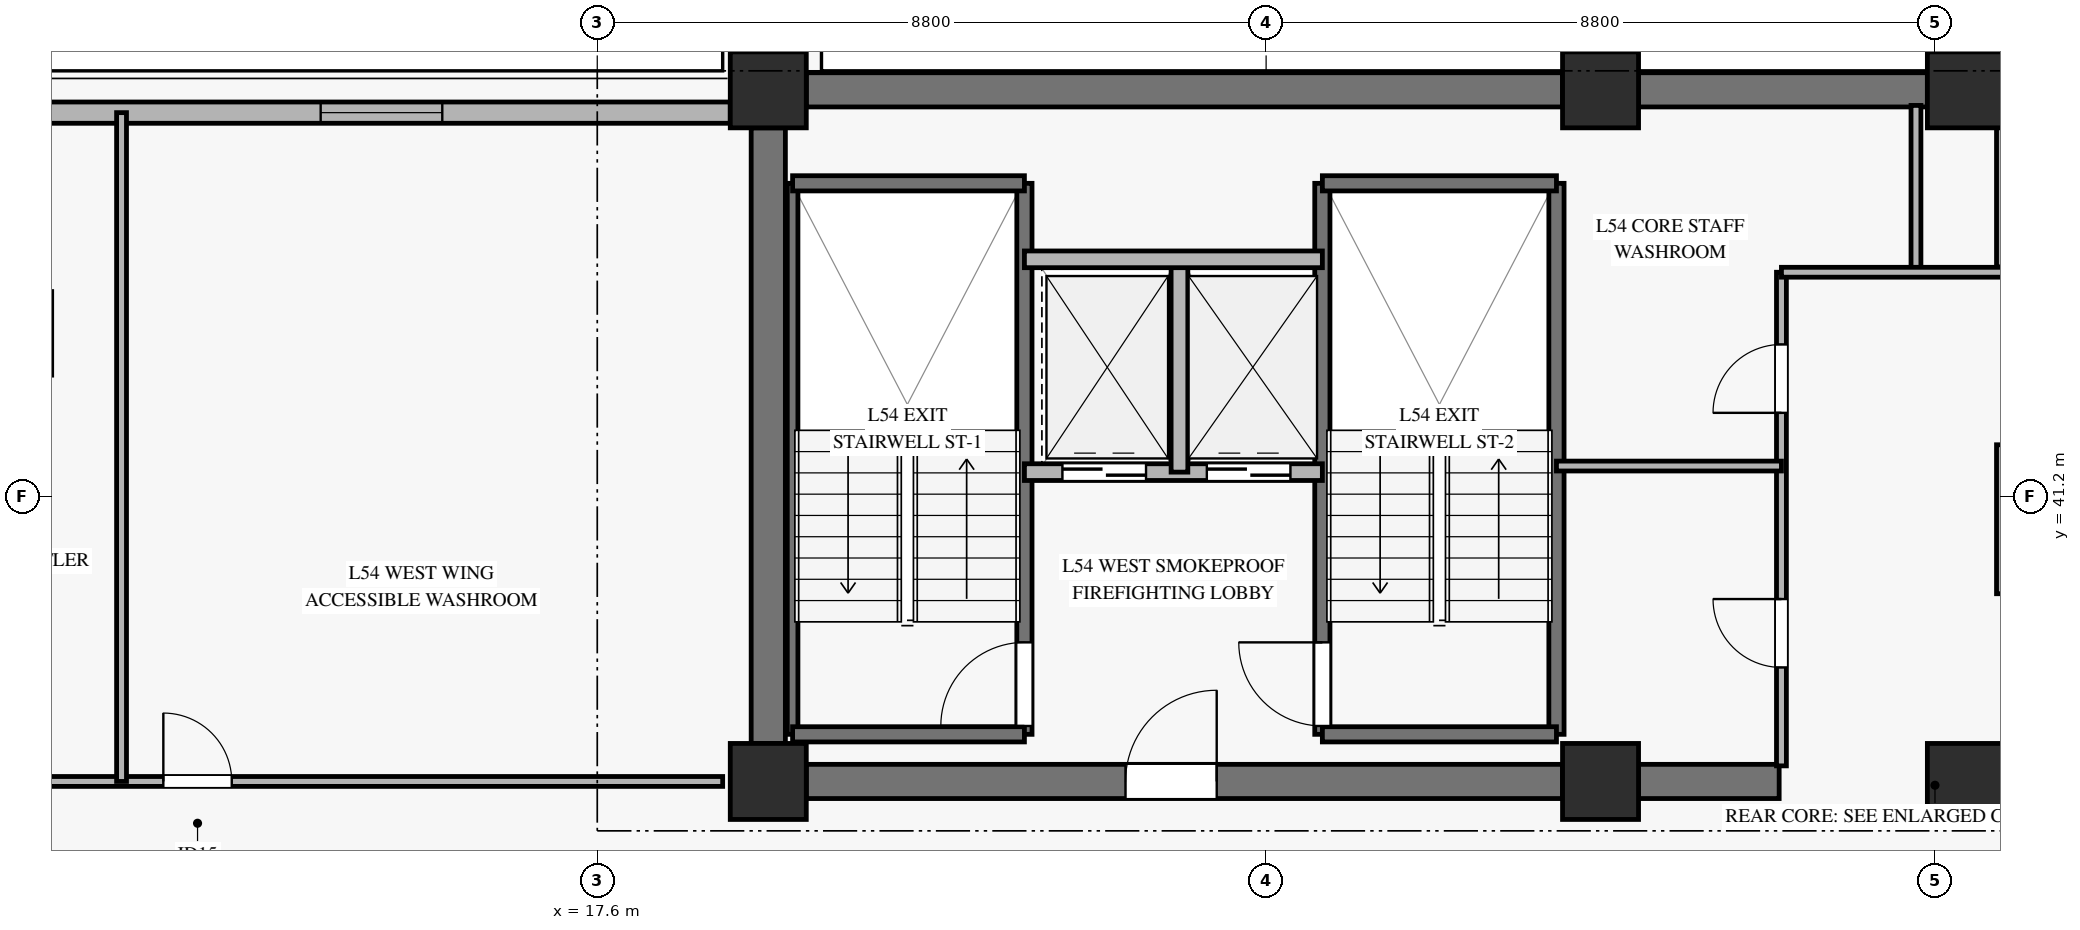
"""IFC4 building model, lengths in metres.
Left out: names, types, materials, properties, quantities, classifications, styles, units other than length and angle.
Written with IfcOpenShell. Run it as: python <this file> out.ifc"""

import sys

from ifc_helpers import new_model, si_unit, direction, frame, frame_2d, origin, origin_2d, place, context, subcontext, project, spatial, rectangle, hollow_rectangle, extrude, source, transform, mapped, element, fill, save


model = new_model("IFC4")
c1 = context("Model", 3, precision=1e-05, world=origin(), true_north=direction((0.0, 1.0)))
c2 = subcontext(c1, "Body", "Model", "MODEL_VIEW")
j1 = project(units=[si_unit("LENGTHUNIT", "METRE"), si_unit("PLANEANGLEUNIT", "RADIAN")], contexts=[c1])
p1 = place(None, origin())
s1 = spatial("IfcSite", under=j1, at=p1, CompositionType="ELEMENT")
p2 = place(p1, origin())
s2 = spatial("IfcBuilding", under=s1, at=p2, CompositionType="ELEMENT")
p3 = place(p2, frame((0.0, 0.0, 213.2)))
s3 = spatial("IfcBuildingStorey", under=s2, at=p3, CompositionType="ELEMENT", Elevation=213.2)
m1 = source(origin(), c2, "Body", "SweptSolid", [
    extrude(rectangle(XDim=1.0, YDim=1.0, at=origin_2d()), origin(), (0.0, 0.0, 1.0), 3.27),
])
for number, where, z_axis, x_axis in (
    (1, (19.85, 37.45, 0.0), (0.0, 0.0, 1.0), (1.0, 0.0, 0.0)),
    (2, (19.85, 46.55, 0.0), (0.0, 0.0, 1.0), (1.0, 0.0, 0.0)),
    (3, (30.8, 37.45, 0.0), (0.0, 0.0, 1.0), (1.0, 0.0, 0.0)),
    (4, (30.8, 46.55, 0.0), (0.0, 0.0, 1.0), (1.0, 0.0, 0.0)),
    (5, (35.6, 37.45, 0.0), (0.0, 0.0, 1.0), (1.0, 0.0, 0.0)),
    (6, (35.6, 46.55, 0.0), (0.0, 0.0, 1.0), (1.0, 0.0, 0.0)),
):
    element("IfcColumn", number, at=place(p3, frame(where, z_axis=z_axis, x_axis=x_axis)), inside=s3, PredefinedType="PILASTER", context=c2, shape_type="MappedRepresentation", body=[
        mapped(m1, transform((0.0, 0.0, 0.0), x_axis=(1.0, 0.0, 0.0), y_axis=(0.0, 1.0, 0.0), z_axis=(0.0, 0.0, 1.0), scale=1.0)),
    ])
p4 = place(p3, frame((20.35, 46.55, 0.0), z_axis=(0.0, 0.0, 1.0), x_axis=(1.0, 0.0, 0.0)))
e7 = element("IfcWall", 7, at=p4, inside=s3, PredefinedType="SHEAR", context=c2, shape_type="SweptSolid", body=[
    extrude(rectangle(XDim=9.95, YDim=0.45, at=frame_2d((4.975, 0.0))), origin(), (0.0, 0.0, 1.0), 3.27),
])
p5 = place(p3, frame((31.3, 46.55, 0.0), z_axis=(0.0, 0.0, 1.0), x_axis=(1.0, 0.0, 0.0)))
e8 = element("IfcWall", 8, at=p5, inside=s3, PredefinedType="SHEAR", context=c2, shape_type="SweptSolid", body=[
    extrude(rectangle(XDim=3.8, YDim=0.45, at=frame_2d((1.9, 0.0))), origin(), (0.0, 0.0, 1.0), 3.27),
])
p6 = place(p3, frame((20.35, 37.45, 0.0), z_axis=(0.0, 0.0, 1.0), x_axis=(1.0, 0.0, 0.0)))
e9 = element("IfcWall", 9, at=p6, inside=s3, PredefinedType="SHEAR", context=c2, shape_type="SweptSolid", body=[
    extrude(rectangle(XDim=9.95, YDim=0.45, at=frame_2d((4.975, 0.0))), origin(), (0.0, 0.0, 1.0), 3.27),
])
p7 = place(p6, frame((4.2, 0.0, 0.0)))
e10 = element("IfcOpeningElement", 10, at=p7, cuts=e9, PredefinedType="OPENING", context=c2, shape_type="SweptSolid", body=[
    extrude(rectangle(XDim=1.2, YDim=2.15, at=frame_2d((0.6, 1.075))), frame((0.0, 0.235, 0.0), z_axis=(0.0, -1.0, 0.0), x_axis=(1.0, 0.0, 0.0)), (0.0, 0.0, 1.0), 0.47),
])
p8 = place(p3, frame((31.3, 37.45, 0.0), z_axis=(0.0, 0.0, 1.0), x_axis=(1.0, 0.0, 0.0)))
e11 = element("IfcWall", 11, at=p8, inside=s3, PredefinedType="SHEAR", context=c2, shape_type="SweptSolid", body=[
    extrude(rectangle(XDim=1.85, YDim=0.45, at=frame_2d((0.925, 0.0))), origin(), (0.0, 0.0, 1.0), 3.27),
])
p9 = place(p3, frame((19.85, 37.95, 0.0), z_axis=(0.0, 0.0, 1.0), x_axis=(0.0, 1.0, 0.0)))
e12 = element("IfcWall", 12, at=p9, inside=s3, PredefinedType="SHEAR", context=c2, shape_type="SweptSolid", body=[
    extrude(rectangle(XDim=8.1, YDim=0.45, at=frame_2d((4.05, 0.0))), origin(), (0.0, 0.0, 1.0), 3.27),
])
m2 = source(origin(), c2, "Body", "SweptSolid", [
    extrude(hollow_rectangle(XDim=1.1, YDim=1.1, WallThickness=0.05, at=origin_2d()), origin(), (0.0, 0.0, 1.0), 3.27),
])
p10 = place(p3, frame((9.872, 43.346, 0.0), z_axis=(0.0, 0.0, 1.0), x_axis=(1.0, 0.0, 0.0)))
e13 = element("IfcColumn", 13, at=p10, inside=s3, PredefinedType="COLUMN", context=c2, shape_type="MappedRepresentation", body=[
    mapped(m2, transform((0.0, 0.0, 0.0), x_axis=(1.0, 0.0, 0.0), y_axis=(0.0, 1.0, 0.0), z_axis=(0.0, 0.0, 1.0), scale=1.0)),
])
p11 = place(p3, frame((10.172, 46.25, 0.0), z_axis=(0.0, 0.0, 1.0), x_axis=(1.0, 0.0, 0.0)))
e14 = element("IfcWall", 14, at=p11, inside=s3, PredefinedType="SOLIDWALL", context=c2, shape_type="SweptSolid", body=[
    extrude(rectangle(XDim=9.178, YDim=0.28, at=frame_2d((4.589, 0.0))), origin(), (0.0, 0.0, 1.0), 2.75),
])
p12 = place(p11, frame((3.789, 0.0, 0.45)))
e15 = element("IfcOpeningElement", 15, at=p12, cuts=e14, PredefinedType="OPENING", context=c2, shape_type="SweptSolid", body=[
    extrude(rectangle(XDim=1.6, YDim=2.0, at=frame_2d((0.8, 1.0))), frame((0.0, 0.15, 0.0), z_axis=(0.0, -1.0, 0.0), x_axis=(1.0, 0.0, 0.0)), (0.0, 0.0, 1.0), 0.3),
])
p13 = place(p3, frame((20.17, 38.07, 0.0), z_axis=(0.0, 0.0, 1.0), x_axis=(0.0, 1.0, 0.0)))
e16 = element("IfcWall", 16, at=p13, inside=s3, PredefinedType="SOLIDWALL", context=c2, shape_type="SweptSolid", body=[
    extrude(rectangle(XDim=7.25, YDim=0.14, at=frame_2d((3.625, 0.0))), origin(), (0.0, 0.0, 1.0), 3.5),
])
p14 = place(p3, frame((23.22, 38.07, 0.0), z_axis=(0.0, 0.0, 1.0), x_axis=(0.0, 1.0, 0.0)))
e17 = element("IfcWall", 17, at=p14, inside=s3, PredefinedType="SOLIDWALL", context=c2, shape_type="SweptSolid", body=[
    extrude(rectangle(XDim=7.25, YDim=0.2, at=frame_2d((3.625, 0.0))), origin(), (0.0, 0.0, 1.0), 3.5),
])
p15 = place(p14, frame((0.11, 0.0, 0.0)))
e18 = element("IfcOpeningElement", 18, at=p15, cuts=e17, PredefinedType="OPENING", context=c2, shape_type="SweptSolid", body=[
    extrude(rectangle(XDim=1.1, YDim=2.15, at=frame_2d((0.55, 1.075))), frame((0.0, 0.11, 0.0), z_axis=(0.0, -1.0, 0.0), x_axis=(1.0, 0.0, 0.0)), (0.0, 0.0, 1.0), 0.22),
])
for number, where, z_axis, x_axis in (
    (19, (20.17, 45.32, 0.0), (0.0, 0.0, 1.0), (1.0, 0.0, 0.0)),
    (20, (20.17, 38.07, 0.0), (0.0, 0.0, 1.0), (1.0, 0.0, 0.0)),
):
    element("IfcWall", number, at=place(p3, frame(where, z_axis=z_axis, x_axis=x_axis)), inside=s3, PredefinedType="SOLIDWALL", context=c2, shape_type="SweptSolid", body=[
        extrude(rectangle(XDim=3.05, YDim=0.2, at=frame_2d((1.525, 0.0))), origin(), (0.0, 0.0, 1.0), 3.5),
    ])
p16 = place(p3, frame((27.14, 38.07, 0.0), z_axis=(0.0, 0.0, 1.0), x_axis=(0.0, 1.0, 0.0)))
e21 = element("IfcWall", 21, at=p16, inside=s3, PredefinedType="SOLIDWALL", context=c2, shape_type="SweptSolid", body=[
    extrude(rectangle(XDim=7.25, YDim=0.2, at=frame_2d((3.625, 0.0))), origin(), (0.0, 0.0, 1.0), 3.5),
])
p17 = place(p16, frame((0.11, 0.0, 0.0)))
e22 = element("IfcOpeningElement", 22, at=p17, cuts=e21, PredefinedType="OPENING", context=c2, shape_type="SweptSolid", body=[
    extrude(rectangle(XDim=1.1, YDim=2.15, at=frame_2d((0.55, 1.075))), frame((0.0, 0.11, 0.0), z_axis=(0.0, -1.0, 0.0), x_axis=(1.0, 0.0, 0.0)), (0.0, 0.0, 1.0), 0.22),
])
p18 = place(p3, frame((30.22, 38.07, 0.0), z_axis=(0.0, 0.0, 1.0), x_axis=(0.0, 1.0, 0.0)))
e23 = element("IfcWall", 23, at=p18, inside=s3, PredefinedType="SOLIDWALL", context=c2, shape_type="SweptSolid", body=[
    extrude(rectangle(XDim=7.25, YDim=0.2, at=frame_2d((3.625, 0.0))), origin(), (0.0, 0.0, 1.0), 3.5),
])
for number, where, z_axis, x_axis in (
    (24, (27.14, 45.32, 0.0), (0.0, 0.0, 1.0), (1.0, 0.0, 0.0)),
    (25, (27.14, 38.07, 0.0), (0.0, 0.0, 1.0), (1.0, 0.0, 0.0)),
):
    element("IfcWall", number, at=place(p3, frame(where, z_axis=z_axis, x_axis=x_axis)), inside=s3, PredefinedType="SOLIDWALL", context=c2, shape_type="SweptSolid", body=[
        extrude(rectangle(XDim=3.08, YDim=0.2, at=frame_2d((1.54, 0.0))), origin(), (0.0, 0.0, 1.0), 3.5),
    ])
p19 = place(p3, frame((23.22, 41.52, 0.0), z_axis=(0.0, 0.0, 1.0), x_axis=(1.0, 0.0, 0.0)))
e26 = element("IfcWall", 26, at=p19, inside=s3, PredefinedType="SOLIDWALL", context=c2, shape_type="SweptSolid", body=[
    extrude(rectangle(XDim=3.92, YDim=0.22, at=frame_2d((1.96, 0.0))), origin(), (0.0, 0.0, 1.0), 3.27),
])
p20 = place(p19, frame((0.5, 0.0, 0.0)))
e27 = element("IfcOpeningElement", 27, at=p20, cuts=e26, PredefinedType="OPENING", context=c2, shape_type="SweptSolid", body=[
    extrude(rectangle(XDim=1.1, YDim=2.2, at=frame_2d((0.55, 1.1))), frame((0.0, 0.12, 0.0), z_axis=(0.0, -1.0, 0.0), x_axis=(1.0, 0.0, 0.0)), (0.0, 0.0, 1.0), 0.24),
])
p21 = place(p19, frame((2.4, 0.0, 0.0)))
e28 = element("IfcOpeningElement", 28, at=p21, cuts=e26, PredefinedType="OPENING", context=c2, shape_type="SweptSolid", body=[
    extrude(rectangle(XDim=1.1, YDim=2.2, at=frame_2d((0.55, 1.1))), frame((0.0, 0.12, 0.0), z_axis=(0.0, -1.0, 0.0), x_axis=(1.0, 0.0, 0.0)), (0.0, 0.0, 1.0), 0.24),
])
p22 = place(p3, frame((25.26, 41.52, 0.0), z_axis=(0.0, 0.0, 1.0), x_axis=(0.0, 1.0, 0.0)))
e29 = element("IfcWall", 29, at=p22, inside=s3, PredefinedType="SOLIDWALL", context=c2, shape_type="SweptSolid", body=[
    extrude(rectangle(XDim=2.8, YDim=0.22, at=frame_2d((1.4, 0.0))), origin(), (0.0, 0.0, 1.0), 3.27),
])
p23 = place(p3, frame((23.22, 44.32, 0.0), z_axis=(0.0, 0.0, 1.0), x_axis=(1.0, 0.0, 0.0)))
e30 = element("IfcWall", 30, at=p23, inside=s3, PredefinedType="SOLIDWALL", context=c2, shape_type="SweptSolid", body=[
    extrude(rectangle(XDim=3.92, YDim=0.22, at=frame_2d((1.96, 0.0))), origin(), (0.0, 0.0, 1.0), 3.27),
])
p24 = place(p3, frame((36.12, 39.92, 0.0), z_axis=(0.0, 0.0, 1.0), x_axis=(0.0, 1.0, 0.0)))
e31 = element("IfcWall", 31, at=p24, inside=s3, PredefinedType="SOLIDWALL", context=c2, shape_type="SweptSolid", body=[
    extrude(rectangle(XDim=1.96, YDim=0.22, at=frame_2d((0.98, 0.0))), origin(), (0.0, 0.0, 1.0), 3.27),
])
p25 = place(p3, frame((36.12, 44.22, 0.0), z_axis=(0.0, 0.0, 1.0), x_axis=(0.0, 1.0, 0.0)))
e32 = element("IfcWall", 32, at=p25, inside=s3, PredefinedType="SOLIDWALL", context=c2, shape_type="SweptSolid", body=[
    extrude(rectangle(XDim=2.125, YDim=0.22, at=frame_2d((1.062, 0.0))), origin(), (0.0, 0.0, 1.0), 3.27),
])
p26 = place(p3, frame((33.18, 37.655, 0.0), z_axis=(0.0, 0.0, 1.0), x_axis=(0.0, 1.0, 0.0)))
e33 = element("IfcWall", 33, at=p26, inside=s3, PredefinedType="PARTITIONING", context=c2, shape_type="SweptSolid", body=[
    extrude(rectangle(XDim=6.495, YDim=0.13, at=frame_2d((3.248, 0.0))), origin(), (0.0, 0.0, 1.0), 2.355),
])
p27 = place(p26, frame((1.295, 0.0, 0.0)))
e34 = element("IfcOpeningElement", 34, at=p27, cuts=e33, PredefinedType="OPENING", context=c2, shape_type="SweptSolid", body=[
    extrude(rectangle(XDim=0.9, YDim=2.1, at=frame_2d((0.45, 1.05))), frame((0.0, 0.075, 0.0), z_axis=(0.0, -1.0, 0.0), x_axis=(1.0, 0.0, 0.0)), (0.0, 0.0, 1.0), 0.15),
])
p28 = place(p26, frame((4.645, 0.0, 0.0)))
e35 = element("IfcOpeningElement", 35, at=p28, cuts=e33, PredefinedType="OPENING", context=c2, shape_type="SweptSolid", body=[
    extrude(rectangle(XDim=0.9, YDim=2.1, at=frame_2d((0.45, 1.05))), frame((0.0, 0.075, 0.0), z_axis=(0.0, -1.0, 0.0), x_axis=(1.0, 0.0, 0.0)), (0.0, 0.0, 1.0), 0.15),
])
p29 = place(p3, frame((34.95, 44.15, 0.0), z_axis=(0.0, 0.0, 1.0), x_axis=(0.0, 1.0, 0.0)))
e36 = element("IfcWall", 36, at=p29, inside=s3, PredefinedType="PARTITIONING", context=c2, shape_type="SweptSolid", body=[
    extrude(rectangle(XDim=2.195, YDim=0.13, at=frame_2d((1.098, 0.0))), origin(), (0.0, 0.0, 1.0), 3.27),
])
p30 = place(p3, frame((33.18, 44.15, 0.0), z_axis=(0.0, 0.0, 1.0), x_axis=(1.0, 0.0, 0.0)))
e37 = element("IfcWall", 37, at=p30, inside=s3, PredefinedType="PARTITIONING", context=c2, shape_type="SweptSolid", body=[
    extrude(rectangle(XDim=2.97, YDim=0.13, at=frame_2d((1.485, 0.0))), origin(), (0.0, 0.0, 1.0), 2.555),
])
p31 = place(p3, frame((30.22, 41.6, 0.0), z_axis=(0.0, 0.0, 1.0), x_axis=(1.0, 0.0, 0.0)))
e38 = element("IfcWall", 38, at=p31, inside=s3, PredefinedType="PARTITIONING", context=c2, shape_type="SweptSolid", body=[
    extrude(rectangle(XDim=2.96, YDim=0.13, at=frame_2d((1.48, 0.0))), origin(), (0.0, 0.0, 1.0), 2.555),
])
p32 = place(p3, frame((7.118, 37.45, 0.0), z_axis=(0.0, 0.0, 1.0), x_axis=(1.0, 0.0, 0.0)))
e39 = element("IfcWall", 39, at=p32, inside=s3, PredefinedType="PARTITIONING", context=c2, shape_type="SweptSolid", body=[
    extrude(rectangle(XDim=12.132, YDim=0.13, at=frame_2d((6.066, 0.0))), origin(), (0.0, 0.0, 1.0), 2.755),
])
p33 = place(p32, frame((0.9, 0.0, 0.0)))
e40 = element("IfcOpeningElement", 40, at=p33, cuts=e39, PredefinedType="OPENING", context=c2, shape_type="SweptSolid", body=[
    extrude(rectangle(XDim=0.95, YDim=2.1, at=frame_2d((0.475, 1.05))), frame((0.0, 0.075, 0.0), z_axis=(0.0, -1.0, 0.0), x_axis=(1.0, 0.0, 0.0)), (0.0, 0.0, 1.0), 0.15),
])
p34 = place(p32, frame((4.773, 0.0, 0.0)))
e41 = element("IfcOpeningElement", 41, at=p34, cuts=e39, PredefinedType="OPENING", context=c2, shape_type="SweptSolid", body=[
    extrude(rectangle(XDim=0.9, YDim=2.1, at=frame_2d((0.45, 1.05))), frame((0.0, 0.075, 0.0), z_axis=(0.0, -1.0, 0.0), x_axis=(1.0, 0.0, 0.0)), (0.0, 0.0, 1.0), 0.15),
])
p35 = place(p3, frame((11.341, 37.45, 0.0), z_axis=(0.0, 0.0, 1.0), x_axis=(0.0, 1.0, 0.0)))
e42 = element("IfcWall", 42, at=p35, inside=s3, PredefinedType="PARTITIONING", context=c2, shape_type="SweptSolid", body=[
    extrude(rectangle(XDim=8.8, YDim=0.13, at=frame_2d((4.4, 0.0))), origin(), (0.0, 0.0, 1.0), 3.27),
])
m3 = source(origin(), c2, "Body", "SweptSolid", [
    extrude(rectangle(XDim=1.6, YDim=2.0, at=frame_2d((0.8, 1.0))), frame((0.0, 0.03, 0.0), z_axis=(0.0, -1.0, 0.0), x_axis=(1.0, 0.0, 0.0)), (0.0, 0.0, 1.0), 0.06),
])
p36 = place(p12, origin())
e43 = element("IfcWindow", 43, at=p36, inside=s3, PartitioningType="SINGLE_PANEL", PredefinedType="WINDOW", context=c2, shape_type="MappedRepresentation", body=[
    mapped(m3, transform((0.0, 0.0, 0.0), x_axis=(1.0, 0.0, 0.0), y_axis=(0.0, 1.0, 0.0), z_axis=(0.0, 0.0, 1.0), scale=1.0)),
])
fill(e15, e43)
m4 = source(origin(), c2, "Body", "SweptSolid", [
    extrude(rectangle(XDim=1.1, YDim=2.15, at=frame_2d((0.55, 1.075))), frame((0.0, 0.025, 0.0), z_axis=(0.0, -1.0, 0.0), x_axis=(1.0, 0.0, 0.0)), (0.0, 0.0, 1.0), 0.05),
])
p37 = place(p15, origin())
e44 = element("IfcDoor", 44, at=p37, inside=s3, OperationType="SINGLE_SWING_LEFT", PredefinedType="DOOR", context=c2, shape_type="MappedRepresentation", body=[
    mapped(m4, transform((0.0, 0.0, 0.0), x_axis=(1.0, 0.0, 0.0), y_axis=(0.0, 1.0, 0.0), z_axis=(0.0, 0.0, 1.0), scale=1.0)),
])
fill(e18, e44)
p38 = place(p17, origin())
e45 = element("IfcDoor", 45, at=p38, inside=s3, OperationType="SINGLE_SWING_RIGHT", PredefinedType="DOOR", context=c2, shape_type="MappedRepresentation", body=[
    mapped(m4, transform((0.0, 0.0, 0.0), x_axis=(1.0, 0.0, 0.0), y_axis=(0.0, 1.0, 0.0), z_axis=(0.0, 0.0, 1.0), scale=1.0)),
])
fill(e22, e45)
m5 = source(origin(), c2, "Body", "SweptSolid", [
    extrude(rectangle(XDim=1.1, YDim=2.2, at=frame_2d((0.55, 1.1))), frame((0.0, 0.025, 0.0), z_axis=(0.0, -1.0, 0.0), x_axis=(1.0, 0.0, 0.0)), (0.0, 0.0, 1.0), 0.05),
])
p39 = place(p20, origin())
e46 = element("IfcDoor", 46, at=p39, inside=s3, OperationType="SLIDING_TO_LEFT", PredefinedType="DOOR", context=c2, shape_type="MappedRepresentation", body=[
    mapped(m5, transform((0.0, 0.0, 0.0), x_axis=(1.0, 0.0, 0.0), y_axis=(0.0, 1.0, 0.0), z_axis=(0.0, 0.0, 1.0), scale=1.0)),
])
fill(e27, e46)
p40 = place(p21, origin())
e47 = element("IfcDoor", 47, at=p40, inside=s3, OperationType="SLIDING_TO_LEFT", PredefinedType="DOOR", context=c2, shape_type="MappedRepresentation", body=[
    mapped(m5, transform((0.0, 0.0, 0.0), x_axis=(1.0, 0.0, 0.0), y_axis=(0.0, 1.0, 0.0), z_axis=(0.0, 0.0, 1.0), scale=1.0)),
])
fill(e28, e47)
m6 = source(origin(), c2, "Body", "SweptSolid", [
    extrude(rectangle(XDim=1.2, YDim=2.15, at=frame_2d((0.6, 1.075))), frame((0.0, 0.025, 0.0), z_axis=(0.0, -1.0, 0.0), x_axis=(1.0, 0.0, 0.0)), (0.0, 0.0, 1.0), 0.05),
])
p41 = place(p7, origin())
e48 = element("IfcDoor", 48, at=p41, inside=s3, OperationType="SINGLE_SWING_RIGHT", PredefinedType="DOOR", context=c2, shape_type="MappedRepresentation", body=[
    mapped(m6, transform((0.0, 0.0, 0.0), x_axis=(1.0, 0.0, 0.0), y_axis=(0.0, 1.0, 0.0), z_axis=(0.0, 0.0, 1.0), scale=1.0)),
])
fill(e10, e48)
m7 = source(origin(), c2, "Body", "SweptSolid", [
    extrude(rectangle(XDim=0.9, YDim=2.1, at=frame_2d((0.45, 1.05))), frame((0.0, 0.025, 0.0), z_axis=(0.0, -1.0, 0.0), x_axis=(1.0, 0.0, 0.0)), (0.0, 0.0, 1.0), 0.05),
])
p42 = place(p27, origin())
e49 = element("IfcDoor", 49, at=p42, inside=s3, OperationType="SINGLE_SWING_RIGHT", PredefinedType="DOOR", context=c2, shape_type="MappedRepresentation", body=[
    mapped(m7, transform((0.0, 0.0, 0.0), x_axis=(1.0, 0.0, 0.0), y_axis=(0.0, 1.0, 0.0), z_axis=(0.0, 0.0, 1.0), scale=1.0)),
])
fill(e34, e49)
p43 = place(p28, origin())
e50 = element("IfcDoor", 50, at=p43, inside=s3, OperationType="SINGLE_SWING_LEFT", PredefinedType="DOOR", context=c2, shape_type="MappedRepresentation", body=[
    mapped(m7, transform((0.0, 0.0, 0.0), x_axis=(1.0, 0.0, 0.0), y_axis=(0.0, 1.0, 0.0), z_axis=(0.0, 0.0, 1.0), scale=1.0)),
])
fill(e35, e50)
p44 = place(p34, origin())
e51 = element("IfcDoor", 51, at=p44, inside=s3, OperationType="SINGLE_SWING_LEFT", PredefinedType="DOOR", context=c2, shape_type="MappedRepresentation", body=[
    mapped(m7, transform((0.0, 0.0, 0.0), x_axis=(1.0, 0.0, 0.0), y_axis=(0.0, 1.0, 0.0), z_axis=(0.0, 0.0, 1.0), scale=1.0)),
])
fill(e41, e51)
save(model, sys.argv[1])
